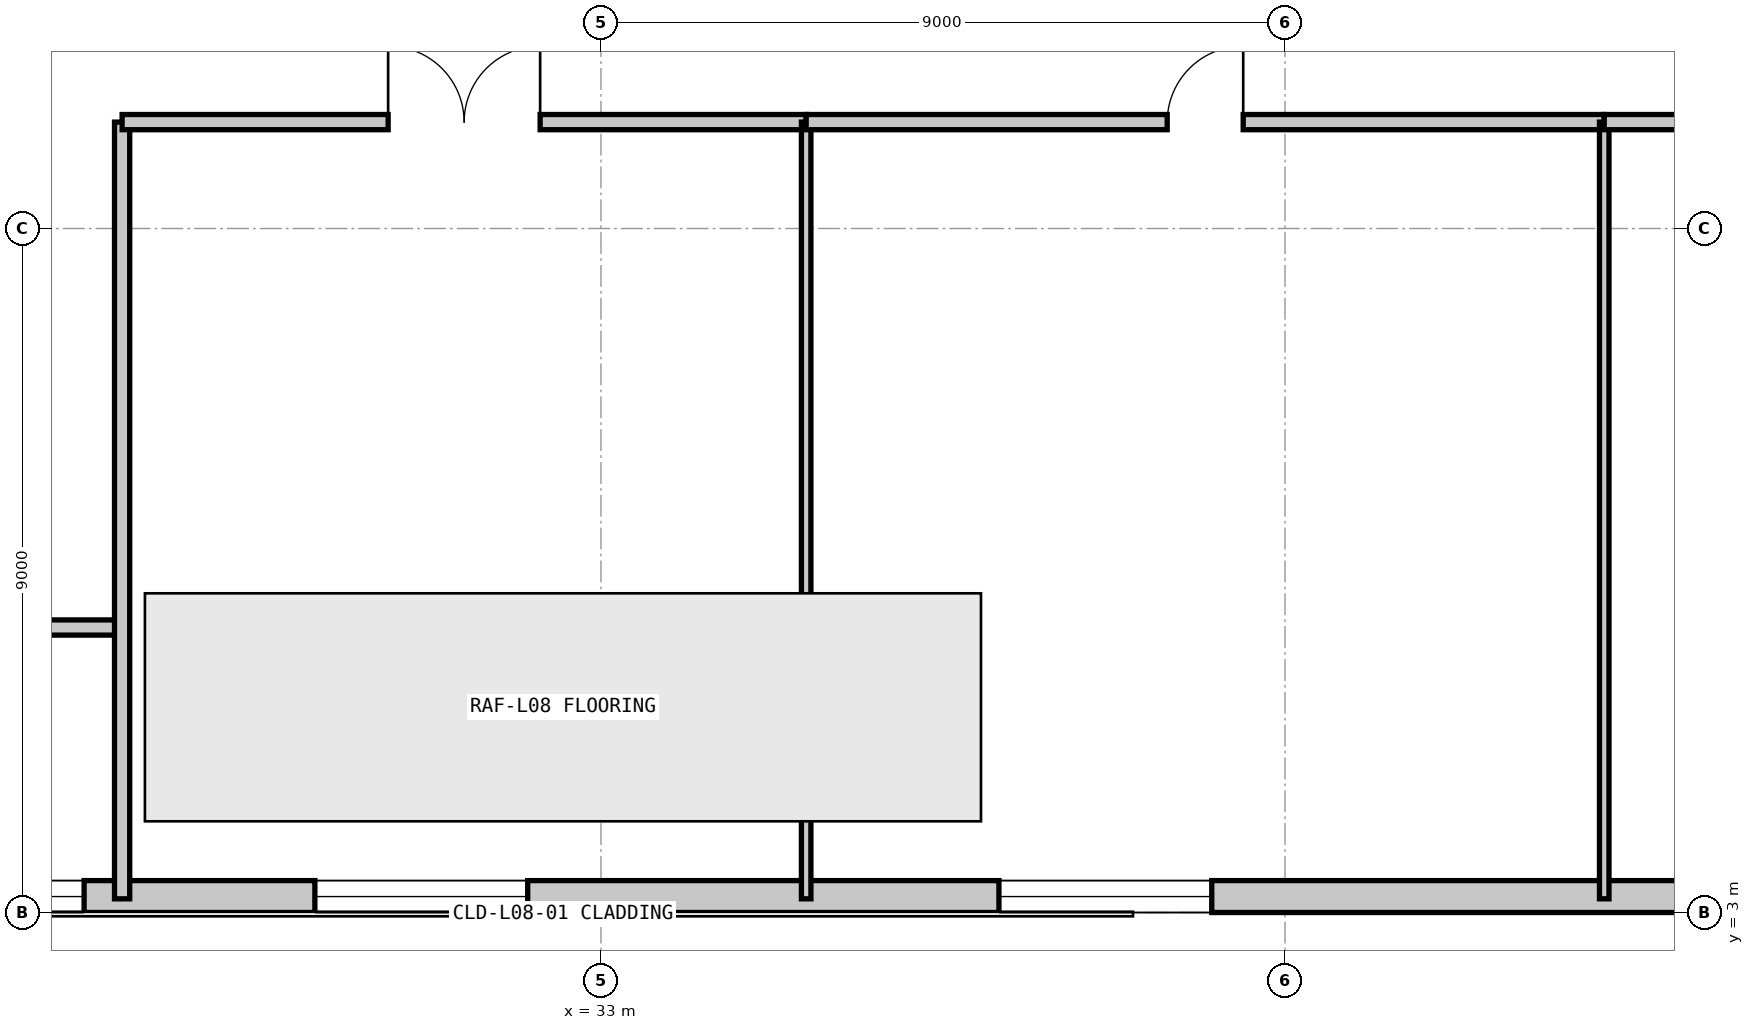
"""IFC4 building model, lengths in metres.
Left out: names, types, materials, properties, quantities, classifications, styles, units other than length and angle.
Written with IfcOpenShell. Run it as: python <this file> out.ifc"""

import sys

from ifc_helpers import new_model, si_unit, direction, frame, frame_2d, origin, origin_2d, place, context, subcontext, project, spatial, rectangle, extrude, element, fill, save


model = new_model("IFC4")
c1 = context("Model", 3, precision=1e-05, world=origin(), true_north=direction((0.0, 1.0)))
c2 = subcontext(c1, "Body", "Model", "MODEL_VIEW")
j1 = project(units=[si_unit("LENGTHUNIT", "METRE"), si_unit("PLANEANGLEUNIT", "RADIAN")], contexts=[c1])
p1 = place(None, origin())
s1 = spatial("IfcSite", under=j1, at=p1, CompositionType="ELEMENT")
p2 = place(p1, origin())
s2 = spatial("IfcBuilding", under=s1, at=p2, CompositionType="ELEMENT")
p3 = place(p2, frame((0.0, 0.0, 38.4)))
s3 = spatial("IfcBuildingStorey", under=s2, at=p3, CompositionType="ELEMENT", Elevation=38.4)
for number, where, z_axis, x_axis in (
    (1, (33.0, 3.0, 0.0), (0.0, 0.0, 1.0), (1.0, 0.0, 0.0)),
    (2, (42.0, 3.0, 0.0), (0.0, 0.0, 1.0), (1.0, 0.0, 0.0)),
):
    element("IfcColumn", number, at=place(p3, frame(where, z_axis=z_axis, x_axis=x_axis)), inside=s3, PredefinedType="COLUMN", context=c2, shape_type="SweptSolid", body=[
        extrude(rectangle(XDim=1.2, YDim=1.2, at=origin_2d()), origin(), (0.0, 0.0, 1.0), 4.2),
    ])
p4 = place(p3, frame((23.9, 3.21, 0.0), z_axis=(0.0, 0.0, 1.0), x_axis=(1.0, 0.0, 0.0)))
e3 = element("IfcWall", 3, at=p4, inside=s3, PredefinedType="STANDARD", context=c2, shape_type="SweptSolid", body=[
    extrude(rectangle(XDim=40.5, YDim=0.42, at=frame_2d((20.25, 0.0))), origin(), (0.0, 0.0, 1.0), 3.98),
])
p5 = place(p4, frame((1.1, 0.0, 0.85)))
e4 = element("IfcOpeningElement", 4, at=p5, cuts=e3, PredefinedType="OPENING", context=c2, shape_type="SweptSolid", body=[
    extrude(rectangle(XDim=1.2, YDim=2.45, at=frame_2d((0.6, 1.225))), frame((0.0, 0.22, 0.0), z_axis=(0.0, -1.0, 0.0), x_axis=(1.0, 0.0, 0.0)), (0.0, 0.0, 1.0), 0.44),
])
p6 = place(p4, frame((5.336, 0.0, 0.85)))
e5 = element("IfcOpeningElement", 5, at=p6, cuts=e3, PredefinedType="OPENING", context=c2, shape_type="SweptSolid", body=[
    extrude(rectangle(XDim=2.8, YDim=2.45, at=frame_2d((1.4, 1.225))), frame((0.0, 0.22, 0.0), z_axis=(0.0, -1.0, 0.0), x_axis=(1.0, 0.0, 0.0)), (0.0, 0.0, 1.0), 0.44),
])
p7 = place(p4, frame((14.336, 0.0, 0.85)))
e6 = element("IfcOpeningElement", 6, at=p7, cuts=e3, PredefinedType="OPENING", context=c2, shape_type="SweptSolid", body=[
    extrude(rectangle(XDim=2.8, YDim=2.45, at=frame_2d((1.4, 1.225))), frame((0.0, 0.22, 0.0), z_axis=(0.0, -1.0, 0.0), x_axis=(1.0, 0.0, 0.0)), (0.0, 0.0, 1.0), 0.44),
])
p8 = place(p4, frame((25.136, 0.0, 0.85)))
e7 = element("IfcOpeningElement", 7, at=p8, cuts=e3, PredefinedType="OPENING", context=c2, shape_type="SweptSolid", body=[
    extrude(rectangle(XDim=1.2, YDim=2.45, at=frame_2d((0.6, 1.225))), frame((0.0, 0.22, 0.0), z_axis=(0.0, -1.0, 0.0), x_axis=(1.0, 0.0, 0.0)), (0.0, 0.0, 1.0), 0.44),
])
p9 = place(p4, frame((34.086, 0.0, 0.85)))
e8 = element("IfcOpeningElement", 8, at=p9, cuts=e3, PredefinedType="OPENING", context=c2, shape_type="SweptSolid", body=[
    extrude(rectangle(XDim=1.2, YDim=2.45, at=frame_2d((0.6, 1.225))), frame((0.0, 0.22, 0.0), z_axis=(0.0, -1.0, 0.0), x_axis=(1.0, 0.0, 0.0)), (0.0, 0.0, 1.0), 0.44),
])
p10 = place(p3, frame((23.85, 6.75, 0.0), z_axis=(0.0, 0.0, 1.0), x_axis=(1.0, 0.0, 0.0)))
e9 = element("IfcWall", 9, at=p10, inside=s3, PredefinedType="PARTITIONING", context=c2, shape_type="SweptSolid", body=[
    extrude(rectangle(XDim=2.85, YDim=0.2, at=frame_2d((1.425, 0.0))), origin(), (0.0, 0.0, 1.0), 3.97),
])
p11 = place(p10, frame((0.7, 0.0, 0.0)))
e10 = element("IfcOpeningElement", 10, at=p11, cuts=e9, PredefinedType="OPENING", context=c2, shape_type="SweptSolid", body=[
    extrude(rectangle(XDim=1.0, YDim=2.15, at=frame_2d((0.5, 1.075))), frame((0.0, 0.11, 0.0), z_axis=(0.0, -1.0, 0.0), x_axis=(1.0, 0.0, 0.0)), (0.0, 0.0, 1.0), 0.22),
])
p12 = place(p3, frame((26.7, 3.18, 0.0), z_axis=(0.0, 0.0, 1.0), x_axis=(0.0, 1.0, 0.0)))
e11 = element("IfcWall", 11, at=p12, inside=s3, PredefinedType="PARTITIONING", context=c2, shape_type="SweptSolid", body=[
    extrude(rectangle(XDim=10.22, YDim=0.2, at=frame_2d((5.11, 0.0))), origin(), (0.0, 0.0, 1.0), 3.97),
])
p13 = place(p3, frame((26.7, 13.4, 0.0), z_axis=(0.0, 0.0, 1.0), x_axis=(1.0, 0.0, 0.0)))
e12 = element("IfcWall", 12, at=p13, inside=s3, PredefinedType="PARTITIONING", context=c2, shape_type="SweptSolid", body=[
    extrude(rectangle(XDim=9.0, YDim=0.2, at=frame_2d((4.5, 0.0))), origin(), (0.0, 0.0, 1.0), 3.97),
])
p14 = place(p13, frame((3.5, 0.0, 0.0)))
e13 = element("IfcOpeningElement", 13, at=p14, cuts=e12, PredefinedType="OPENING", context=c2, shape_type="SweptSolid", body=[
    extrude(rectangle(XDim=2.0, YDim=2.5, at=frame_2d((1.0, 1.25))), frame((0.0, 0.11, 0.0), z_axis=(0.0, -1.0, 0.0), x_axis=(1.0, 0.0, 0.0)), (0.0, 0.0, 1.0), 0.22),
])
p15 = place(p3, frame((35.7, 3.18, 0.0), z_axis=(0.0, 0.0, 1.0), x_axis=(0.0, 1.0, 0.0)))
e14 = element("IfcWall", 14, at=p15, inside=s3, PredefinedType="PARTITIONING", context=c2, shape_type="SweptSolid", body=[
    extrude(rectangle(XDim=10.22, YDim=0.125, at=frame_2d((5.11, 0.0))), origin(), (0.0, 0.0, 1.0), 3.97),
])
p16 = place(p3, frame((35.7, 13.4, 0.0), z_axis=(0.0, 0.0, 1.0), x_axis=(1.0, 0.0, 0.0)))
e15 = element("IfcWall", 15, at=p16, inside=s3, PredefinedType="PARTITIONING", context=c2, shape_type="SweptSolid", body=[
    extrude(rectangle(XDim=10.5, YDim=0.2, at=frame_2d((5.25, 0.0))), origin(), (0.0, 0.0, 1.0), 3.97),
])
p17 = place(p16, frame((4.75, 0.0, 0.0)))
e16 = element("IfcOpeningElement", 16, at=p17, cuts=e15, PredefinedType="OPENING", context=c2, shape_type="SweptSolid", body=[
    extrude(rectangle(XDim=1.0, YDim=2.15, at=frame_2d((0.5, 1.075))), frame((0.0, 0.11, 0.0), z_axis=(0.0, -1.0, 0.0), x_axis=(1.0, 0.0, 0.0)), (0.0, 0.0, 1.0), 0.22),
])
p18 = place(p3, frame((46.2, 3.18, 0.0), z_axis=(0.0, 0.0, 1.0), x_axis=(0.0, 1.0, 0.0)))
e17 = element("IfcWall", 17, at=p18, inside=s3, PredefinedType="PARTITIONING", context=c2, shape_type="SweptSolid", body=[
    extrude(rectangle(XDim=10.22, YDim=0.125, at=frame_2d((5.11, 0.0))), origin(), (0.0, 0.0, 1.0), 3.97),
])
p19 = place(p3, frame((46.2, 13.4, 0.0), z_axis=(0.0, 0.0, 1.0), x_axis=(1.0, 0.0, 0.0)))
e18 = element("IfcWall", 18, at=p19, inside=s3, PredefinedType="PARTITIONING", context=c2, shape_type="SweptSolid", body=[
    extrude(rectangle(XDim=9.0, YDim=0.2, at=frame_2d((4.5, 0.0))), origin(), (0.0, 0.0, 1.0), 3.97),
])
p20 = place(p19, frame((4.0, 0.0, 0.0)))
e19 = element("IfcOpeningElement", 19, at=p20, cuts=e18, PredefinedType="OPENING", context=c2, shape_type="SweptSolid", body=[
    extrude(rectangle(XDim=1.0, YDim=2.15, at=frame_2d((0.5, 1.075))), frame((0.0, 0.11, 0.0), z_axis=(0.0, -1.0, 0.0), x_axis=(1.0, 0.0, 0.0)), (0.0, 0.0, 1.0), 0.22),
])
p21 = place(p14, origin())
e20 = element("IfcDoor", 20, at=p21, inside=s3, OperationType="DOUBLE_DOOR_SINGLE_SWING", PredefinedType="DOOR", context=c2, shape_type="SweptSolid", body=[
    extrude(rectangle(XDim=2.0, YDim=2.5, at=frame_2d((1.0, 1.25))), frame((0.0, 0.025, 0.0), z_axis=(0.0, -1.0, 0.0), x_axis=(1.0, 0.0, 0.0)), (0.0, 0.0, 1.0), 0.05),
])
fill(e13, e20)
p22 = place(p17, origin())
e21 = element("IfcDoor", 21, at=p22, inside=s3, OperationType="SINGLE_SWING_RIGHT", PredefinedType="DOOR", context=c2, shape_type="SweptSolid", body=[
    extrude(rectangle(XDim=1.0, YDim=2.15, at=frame_2d((0.5, 1.075))), frame((0.0, 0.025, 0.0), z_axis=(0.0, -1.0, 0.0), x_axis=(1.0, 0.0, 0.0)), (0.0, 0.0, 1.0), 0.05),
])
fill(e16, e21)
p23 = place(p5, origin())
e22 = element("IfcWindow", 22, at=p23, inside=s3, PartitioningType="SINGLE_PANEL", PredefinedType="WINDOW", context=c2, shape_type="SweptSolid", body=[
    extrude(rectangle(XDim=1.2, YDim=2.45, at=frame_2d((0.6, 1.225))), frame((0.0, 0.11, 0.0), z_axis=(0.0, -1.0, 0.0), x_axis=(1.0, 0.0, 0.0)), (0.0, 0.0, 1.0), 0.06),
])
fill(e4, e22)
p24 = place(p6, origin())
e23 = element("IfcWindow", 23, at=p24, inside=s3, PartitioningType="SINGLE_PANEL", PredefinedType="WINDOW", context=c2, shape_type="SweptSolid", body=[
    extrude(rectangle(XDim=2.8, YDim=2.45, at=frame_2d((1.4, 1.225))), frame((0.0, 0.11, 0.0), z_axis=(0.0, -1.0, 0.0), x_axis=(1.0, 0.0, 0.0)), (0.0, 0.0, 1.0), 0.06),
])
fill(e5, e23)
p25 = place(p7, origin())
e24 = element("IfcWindow", 24, at=p25, inside=s3, PartitioningType="SINGLE_PANEL", PredefinedType="WINDOW", context=c2, shape_type="SweptSolid", body=[
    extrude(rectangle(XDim=2.8, YDim=2.45, at=frame_2d((1.4, 1.225))), frame((0.0, 0.11, 0.0), z_axis=(0.0, -1.0, 0.0), x_axis=(1.0, 0.0, 0.0)), (0.0, 0.0, 1.0), 0.06),
])
fill(e6, e24)
save(model, sys.argv[1])
